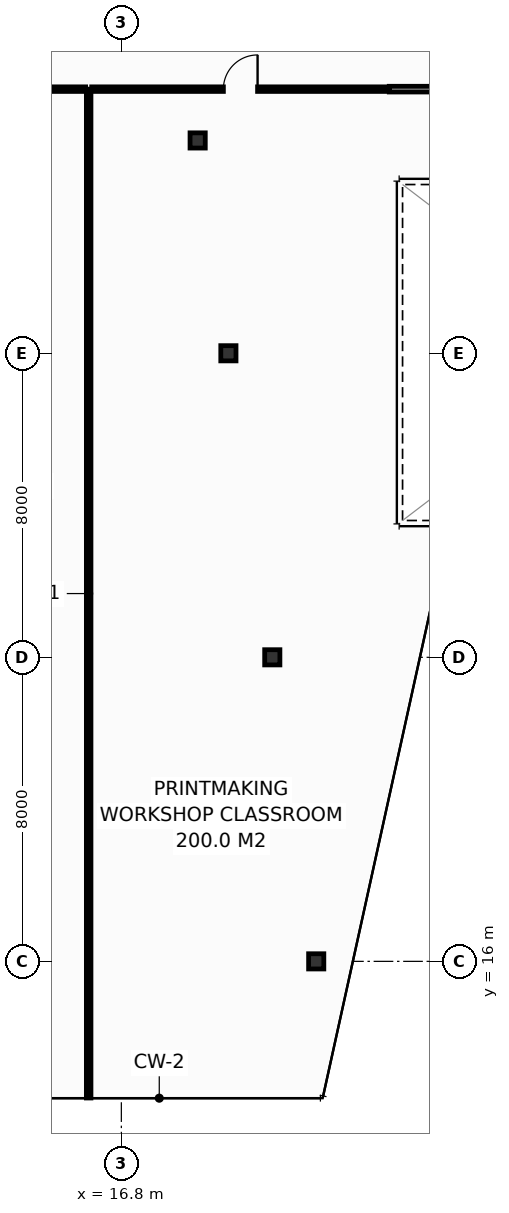
"""IFC4 building model, lengths in metres.
Left out: names, types, materials, properties, quantities, classifications, styles, units other than length and angle.
Written with IfcOpenShell. Run it as: python <this file> out.ifc"""

import sys

from ifc_helpers import new_model, si_unit, direction, frame, frame_2d, origin, origin_2d, place, context, subcontext, project, spatial, rectangle, hollow_rectangle, extrude, element, fill, save


model = new_model("IFC4")
c1 = context("Model", 3, precision=1e-05, world=origin(), true_north=direction((0.0, 1.0)))
c2 = subcontext(c1, "Body", "Model", "MODEL_VIEW")
j1 = project(units=[si_unit("LENGTHUNIT", "METRE"), si_unit("PLANEANGLEUNIT", "RADIAN")], contexts=[c1])
p1 = place(None, origin())
s1 = spatial("IfcSite", under=j1, at=p1, CompositionType="ELEMENT")
p2 = place(p1, origin())
s2 = spatial("IfcBuilding", under=s1, at=p2, CompositionType="ELEMENT")
p3 = place(p2, frame((0.0, 0.0, 213.2)))
s3 = spatial("IfcBuildingStorey", under=s2, at=p3, CompositionType="ELEMENT", Elevation=213.2)
for number, where, z_axis, x_axis in (
    (1, (21.928, 16.0, 0.0), (0.0, 0.0, 1.0), (1.0, 0.0, 0.0)),
    (2, (20.772, 24.0, 0.0), (0.0, 0.0, 1.0), (1.0, 0.0, 0.0)),
    (3, (19.617, 32.0, 0.0), (0.0, 0.0, 1.0), (1.0, 0.0, 0.0)),
    (4, (18.808, 37.6, 0.0), (0.0, 0.0, 1.0), (1.0, 0.0, 0.0)),
):
    element("IfcColumn", number, at=place(p3, frame(where, z_axis=z_axis, x_axis=x_axis)), inside=s3, PredefinedType="COLUMN", context=c2, shape_type="SweptSolid", body=[
        extrude(hollow_rectangle(XDim=0.4, YDim=0.4, WallThickness=0.016, at=origin_2d()), origin(), (0.0, 0.0, 1.0), 3.8),
    ])
p4 = place(p3, frame((15.94, 12.405, 0.0), z_axis=(0.0, 0.0, 1.0), x_axis=(0.0, 1.0, 0.0)))
e5 = element("IfcWall", 5, at=p4, inside=s3, PredefinedType="PARTITIONING", context=c2, shape_type="SweptSolid", body=[
    extrude(rectangle(XDim=26.545, YDim=0.12, at=frame_2d((13.272, 0.0))), origin(), (0.0, 0.0, 1.0), 2.835),
])
p5 = place(p3, frame((6.363, 38.95, 0.0), z_axis=(0.0, 0.0, 1.0), x_axis=(1.0, 0.0, 0.0)))
e6 = element("IfcWall", 6, at=p5, inside=s3, PredefinedType="PARTITIONING", context=c2, shape_type="SweptSolid", body=[
    extrude(rectangle(XDim=9.497, YDim=0.12, at=frame_2d((4.749, 0.0))), origin(), (0.0, 0.0, 1.0), 3.035),
])
p6 = place(p5, frame((4.299, 0.0, 0.0)))
e7 = element("IfcOpeningElement", 7, at=p6, cuts=e6, PredefinedType="OPENING", context=c2, shape_type="SweptSolid", body=[
    extrude(rectangle(XDim=0.9, YDim=2.1, at=frame_2d((0.45, 1.05))), frame((0.0, 0.07, 0.0), z_axis=(0.0, -1.0, 0.0), x_axis=(1.0, 0.0, 0.0)), (0.0, 0.0, 1.0), 0.14),
])
p7 = place(p3, frame((16.02, 38.95, 0.0), z_axis=(0.0, 0.0, 1.0), x_axis=(1.0, 0.0, 0.0)))
e8 = element("IfcWall", 8, at=p7, inside=s3, PredefinedType="PARTITIONING", context=c2, shape_type="SweptSolid", body=[
    extrude(rectangle(XDim=7.83, YDim=0.12, at=frame_2d((3.915, 0.0))), origin(), (0.0, 0.0, 1.0), 2.835),
])
p8 = place(p7, frame((3.465, 0.0, 0.0)))
e9 = element("IfcOpeningElement", 9, at=p8, cuts=e8, PredefinedType="OPENING", context=c2, shape_type="SweptSolid", body=[
    extrude(rectangle(XDim=0.9, YDim=2.1, at=frame_2d((0.45, 1.05))), frame((0.0, 0.07, 0.0), z_axis=(0.0, -1.0, 0.0), x_axis=(1.0, 0.0, 0.0)), (0.0, 0.0, 1.0), 0.14),
])
p9 = place(p3, frame((23.85, 38.95, 0.0), z_axis=(0.0, 0.0, 1.0), x_axis=(1.0, 0.0, 0.0)))
e10 = element("IfcWall", 10, at=p9, inside=s3, PredefinedType="PARTITIONING", context=c2, shape_type="SweptSolid", body=[
    extrude(rectangle(XDim=12.3, YDim=0.15, at=frame_2d((6.15, 0.0))), origin(), (0.0, 0.0, 1.0), 3.55),
])
p10 = place(p8, origin())
e11 = element("IfcDoor", 11, at=p10, inside=s3, OperationType="SINGLE_SWING_RIGHT", PredefinedType="DOOR", context=c2, shape_type="SweptSolid", body=[
    extrude(rectangle(XDim=0.9, YDim=2.1, at=frame_2d((0.45, 1.05))), frame((0.0, 0.025, 0.0), z_axis=(0.0, -1.0, 0.0), x_axis=(1.0, 0.0, 0.0)), (0.0, 0.0, 1.0), 0.05),
])
fill(e9, e11)
save(model, sys.argv[1])
